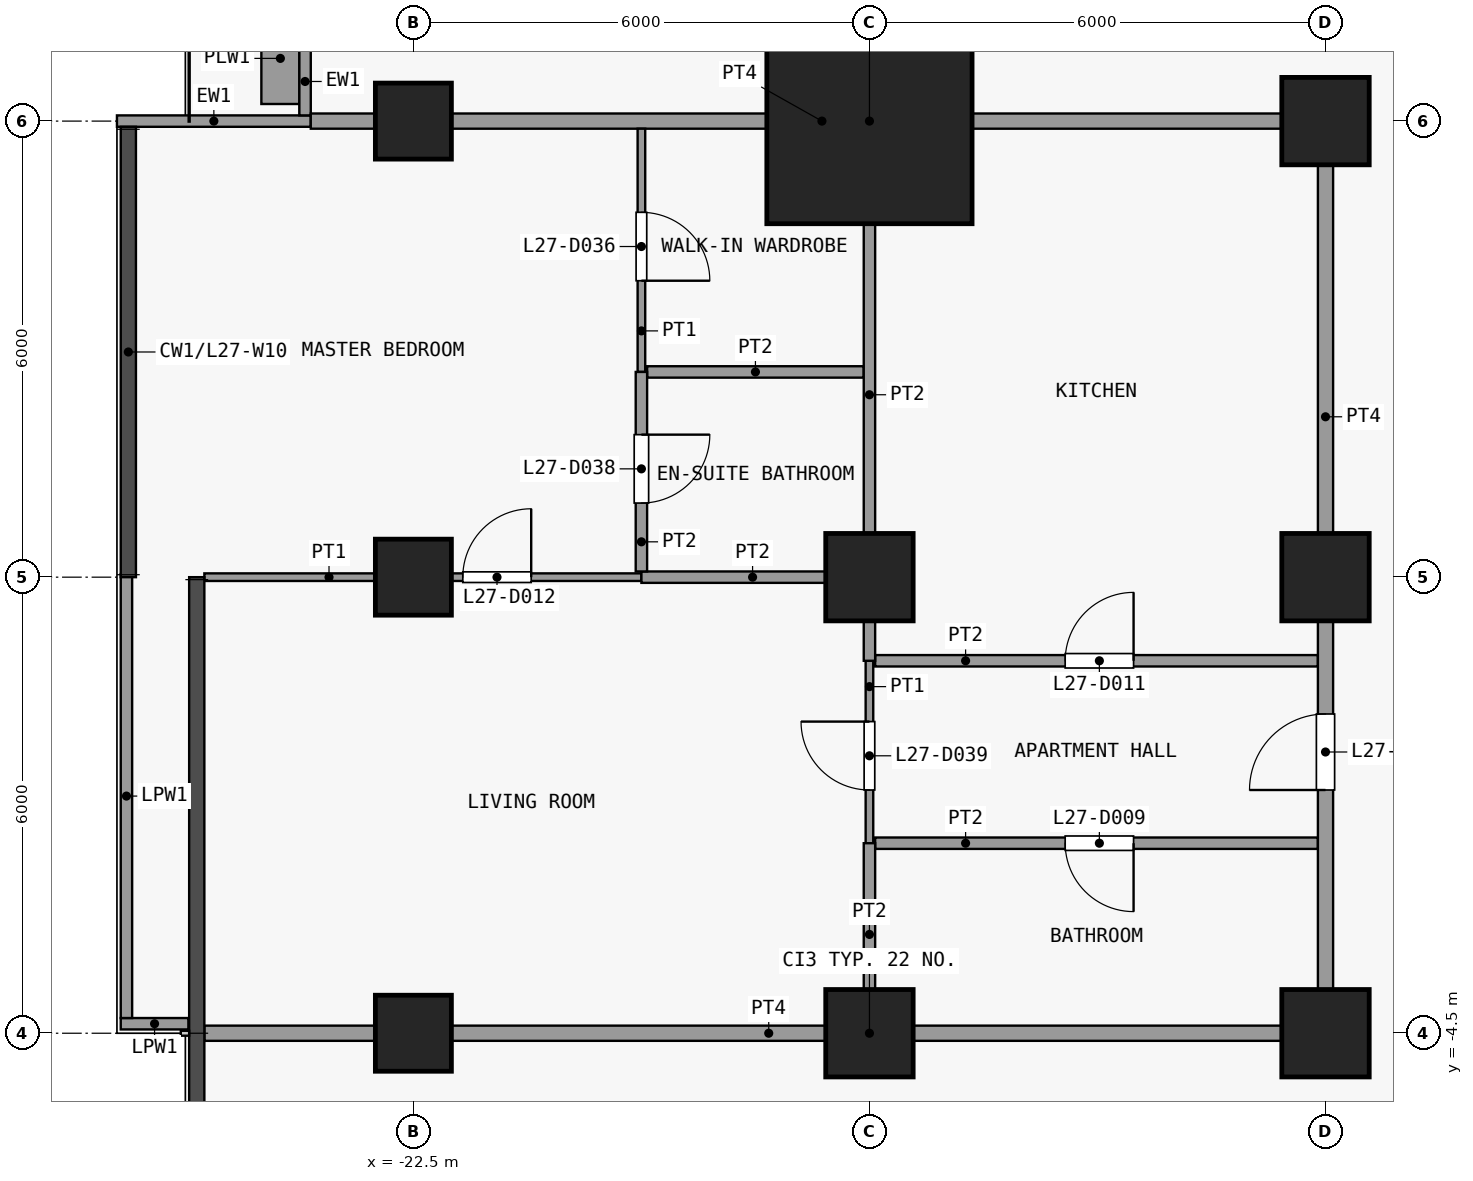
"""IFC4 building model, lengths in metres.
Left out: names, types, materials, properties, quantities, classifications, styles, units other than length and angle.
Written with IfcOpenShell. Run it as: python <this file> out.ifc"""

import sys

from ifc_helpers import new_model, si_unit, direction, frame, frame_2d, origin, origin_2d, place, context, subcontext, project, spatial, rectangle, extrude, element, fill, save


model = new_model("IFC4")
c1 = context("Model", 3, precision=1e-05, world=origin(), true_north=direction((0.0, 1.0)))
c2 = subcontext(c1, "Body", "Model", "MODEL_VIEW")
j1 = project(units=[si_unit("LENGTHUNIT", "METRE"), si_unit("PLANEANGLEUNIT", "RADIAN")], contexts=[c1])
p1 = place(None, origin())
s1 = spatial("IfcSite", under=j1, at=p1, CompositionType="ELEMENT")
p2 = place(p1, origin())
s2 = spatial("IfcBuilding", under=s1, at=p2, CompositionType="ELEMENT")
p3 = place(p2, frame((0.0, 0.0, 109.9)))
s3 = spatial("IfcBuildingStorey", under=s2, at=p3, CompositionType="ELEMENT", Elevation=109.9)
for number, where, z_axis, x_axis in (
    (1, (-22.5, -4.5, 0.0), (0.0, 0.0, 1.0), (1.0, 0.0, 0.0)),
    (2, (-22.5, 1.5, 0.0), (0.0, 0.0, 1.0), (1.0, 0.0, 0.0)),
    (3, (-22.5, 7.5, 0.0), (0.0, 0.0, 1.0), (1.0, 0.0, 0.0)),
):
    element("IfcColumn", number, at=place(p3, frame(where, z_axis=z_axis, x_axis=x_axis)), inside=s3, PredefinedType="COLUMN", context=c2, shape_type="SweptSolid", body=[
        extrude(rectangle(XDim=1.0, YDim=1.0, at=origin_2d()), origin(), (0.0, 0.0, 1.0), 3.6),
    ])
for number, where, z_axis, x_axis in (
    (4, (-16.5, -4.5, 0.0), (0.0, 0.0, 1.0), (1.0, 0.0, 0.0)),
    (5, (-16.5, 1.5, 0.0), (0.0, 0.0, 1.0), (1.0, 0.0, 0.0)),
):
    element("IfcColumn", number, at=place(p3, frame(where, z_axis=z_axis, x_axis=x_axis)), inside=s3, PredefinedType="COLUMN", context=c2, shape_type="SweptSolid", body=[
        extrude(rectangle(XDim=1.15, YDim=1.15, at=origin_2d()), origin(), (0.0, 0.0, 1.0), 3.6),
    ])
p4 = place(p3, frame((-16.5, 7.5, 0.0), z_axis=(0.0, 0.0, 1.0), x_axis=(1.0, 0.0, 0.0)))
e6 = element("IfcColumn", 6, at=p4, inside=s3, PredefinedType="COLUMN", context=c2, shape_type="SweptSolid", body=[
    extrude(rectangle(XDim=2.7, YDim=2.7, at=origin_2d()), origin(), (0.0, 0.0, 1.0), 3.6),
])
for number, where, z_axis, x_axis in (
    (7, (-10.5, -4.5, 0.0), (0.0, 0.0, 1.0), (1.0, 0.0, 0.0)),
    (8, (-10.5, 1.5, 0.0), (0.0, 0.0, 1.0), (1.0, 0.0, 0.0)),
    (9, (-10.5, 7.5, 0.0), (0.0, 0.0, 1.0), (1.0, 0.0, 0.0)),
):
    element("IfcColumn", number, at=place(p3, frame(where, z_axis=z_axis, x_axis=x_axis)), inside=s3, PredefinedType="COLUMN", context=c2, shape_type="SweptSolid", body=[
        extrude(rectangle(XDim=1.15, YDim=1.15, at=origin_2d()), origin(), (0.0, 0.0, 1.0), 3.6),
    ])
p5 = place(p3, frame((-23.85, 7.5, 0.0), z_axis=(0.0, 0.0, 1.0), x_axis=(-1.0, 0.0, 0.0)))
e10 = element("IfcWall", 10, at=p5, inside=s3, PredefinedType="SOLIDWALL", context=c2, shape_type="SweptSolid", body=[
    extrude(rectangle(XDim=2.55, YDim=0.15, at=frame_2d((1.275, 0.0))), origin(), (0.0, 0.0, 1.0), 3.3),
])
p6 = place(p3, frame((-23.925, 7.575, 0.0), z_axis=(0.0, 0.0, 1.0), x_axis=(0.0, 1.0, 0.0)))
e11 = element("IfcWall", 11, at=p6, inside=s3, PredefinedType="SOLIDWALL", context=c2, shape_type="SweptSolid", body=[
    extrude(rectangle(XDim=5.85, YDim=0.15, at=frame_2d((2.925, 0.0))), origin(), (0.0, 0.0, 1.0), 3.3),
])
p7 = place(p6, frame((3.825, 0.0, 0.0)))
e12 = element("IfcOpeningElement", 12, at=p7, cuts=e11, PredefinedType="OPENING", context=c2, shape_type="SweptSolid", body=[
    extrude(rectangle(XDim=1.2, YDim=2.4, at=frame_2d((0.6, 1.2))), frame((0.0, 0.085, 0.0), z_axis=(0.0, -1.0, 0.0), x_axis=(1.0, 0.0, 0.0)), (0.0, 0.0, 1.0), 0.17),
])
p8 = place(p6, frame((1.012, 0.0, 0.9)))
e13 = element("IfcOpeningElement", 13, at=p8, cuts=e11, PredefinedType="OPENING", context=c2, shape_type="SweptSolid", body=[
    extrude(rectangle(XDim=1.8, YDim=2.1, at=frame_2d((0.9, 1.05))), frame((0.0, 0.085, 0.0), z_axis=(0.0, -1.0, 0.0), x_axis=(1.0, 0.0, 0.0)), (0.0, 0.0, 1.0), 0.17),
])
p9 = place(p3, frame((-24.25, 7.725, 0.0), z_axis=(0.0, 0.0, 1.0), x_axis=(0.0, 1.0, 0.0)))
e14 = element("IfcWall", 14, at=p9, inside=s3, PredefinedType="USERDEFINED", context=c2, shape_type="SweptSolid", body=[
    extrude(rectangle(XDim=1.2, YDim=0.5, at=frame_2d((0.6, 0.0))), origin(), (0.0, 0.0, 1.0), 0.9),
])
p10 = place(p3, frame((-25.46, -4.375, 0.0), z_axis=(0.0, 0.0, 1.0), x_axis=(-1.0, 0.0, 0.0)))
e15 = element("IfcWall", 15, at=p10, inside=s3, PredefinedType="PARAPET", context=c2, shape_type="SweptSolid", body=[
    extrude(rectangle(XDim=0.89, YDim=0.15, at=frame_2d((0.445, 0.0))), origin(), (0.0, 0.0, 1.0), 1.15),
])
p11 = place(p3, frame((-26.275, -4.3, 0.0), z_axis=(0.0, 0.0, 1.0), x_axis=(0.0, 1.0, 0.0)))
e16 = element("IfcWall", 16, at=p11, inside=s3, PredefinedType="PARAPET", context=c2, shape_type="SweptSolid", body=[
    extrude(rectangle(XDim=5.84, YDim=0.15, at=frame_2d((2.92, 0.0))), origin(), (0.0, 0.0, 1.0), 1.15),
])
p12 = place(p3, frame((-25.25, -4.5, 0.0), z_axis=(0.0, 0.0, 1.0), x_axis=(1.0, 0.0, 0.0)))
e17 = element("IfcWall", 17, at=p12, inside=s3, PredefinedType="PARTITIONING", context=c2, shape_type="SweptSolid", body=[
    extrude(rectangle(XDim=14.85, YDim=0.2, at=frame_2d((7.425, 0.0))), origin(), (0.0, 0.0, 1.0), 3.3),
])
p13 = place(p3, frame((-16.425, -2.0, 0.0), z_axis=(0.0, 0.0, 1.0), x_axis=(1.0, 0.0, 0.0)))
e18 = element("IfcWall", 18, at=p13, inside=s3, PredefinedType="PARTITIONING", context=c2, shape_type="SweptSolid", body=[
    extrude(rectangle(XDim=5.825, YDim=0.15, at=frame_2d((2.913, 0.0))), origin(), (0.0, 0.0, 1.0), 3.3),
])
p14 = place(p13, frame((2.5, 0.0, 0.0)))
e19 = element("IfcOpeningElement", 19, at=p14, cuts=e18, PredefinedType="OPENING", context=c2, shape_type="SweptSolid", body=[
    extrude(rectangle(XDim=0.9, YDim=2.1, at=frame_2d((0.45, 1.05))), frame((0.0, 0.085, 0.0), z_axis=(0.0, -1.0, 0.0), x_axis=(1.0, 0.0, 0.0)), (0.0, 0.0, 1.0), 0.17),
])
p15 = place(p3, frame((-16.425, 0.4, 0.0), z_axis=(0.0, 0.0, 1.0), x_axis=(1.0, 0.0, 0.0)))
e20 = element("IfcWall", 20, at=p15, inside=s3, PredefinedType="PARTITIONING", context=c2, shape_type="SweptSolid", body=[
    extrude(rectangle(XDim=5.825, YDim=0.15, at=frame_2d((2.913, 0.0))), origin(), (0.0, 0.0, 1.0), 3.3),
])
p16 = place(p15, frame((2.5, 0.0, 0.0)))
e21 = element("IfcOpeningElement", 21, at=p16, cuts=e20, PredefinedType="OPENING", context=c2, shape_type="SweptSolid", body=[
    extrude(rectangle(XDim=0.9, YDim=2.1, at=frame_2d((0.45, 1.05))), frame((0.0, 0.085, 0.0), z_axis=(0.0, -1.0, 0.0), x_axis=(1.0, 0.0, 0.0)), (0.0, 0.0, 1.0), 0.17),
])
p17 = place(p3, frame((-25.25, 1.5, 0.0), z_axis=(0.0, 0.0, 1.0), x_axis=(1.0, 0.0, 0.0)))
e22 = element("IfcWall", 22, at=p17, inside=s3, PredefinedType="PARTITIONING", context=c2, shape_type="SweptSolid", body=[
    extrude(rectangle(XDim=5.75, YDim=0.1, at=frame_2d((2.875, 0.0))), origin(), (0.0, 0.0, 1.0), 3.3),
])
p18 = place(p17, frame((3.4, 0.0, 0.0)))
e23 = element("IfcOpeningElement", 23, at=p18, cuts=e22, PredefinedType="OPENING", context=c2, shape_type="SweptSolid", body=[
    extrude(rectangle(XDim=0.9, YDim=2.1, at=frame_2d((0.45, 1.05))), frame((0.0, 0.06, 0.0), z_axis=(0.0, -1.0, 0.0), x_axis=(1.0, 0.0, 0.0)), (0.0, 0.0, 1.0), 0.12),
])
p19 = place(p3, frame((-19.5, 1.5, 0.0), z_axis=(0.0, 0.0, 1.0), x_axis=(1.0, 0.0, 0.0)))
e24 = element("IfcWall", 24, at=p19, inside=s3, PredefinedType="PARTITIONING", context=c2, shape_type="SweptSolid", body=[
    extrude(rectangle(XDim=2.925, YDim=0.15, at=frame_2d((1.462, 0.0))), origin(), (0.0, 0.0, 1.0), 3.3),
])
p20 = place(p3, frame((-19.425, 4.2, 0.0), z_axis=(0.0, 0.0, 1.0), x_axis=(1.0, 0.0, 0.0)))
e25 = element("IfcWall", 25, at=p20, inside=s3, PredefinedType="PARTITIONING", context=c2, shape_type="SweptSolid", body=[
    extrude(rectangle(XDim=2.85, YDim=0.15, at=frame_2d((1.425, 0.0))), origin(), (0.0, 0.0, 1.0), 3.3),
])
p21 = place(p3, frame((-23.85, 7.5, 0.0), z_axis=(0.0, 0.0, 1.0), x_axis=(1.0, 0.0, 0.0)))
e26 = element("IfcWall", 26, at=p21, inside=s3, PredefinedType="PARTITIONING", context=c2, shape_type="SweptSolid", body=[
    extrude(rectangle(XDim=13.45, YDim=0.2, at=frame_2d((6.725, 0.0))), origin(), (0.0, 0.0, 1.0), 3.3),
])
p22 = place(p3, frame((-19.5, 4.2, 0.0), z_axis=(0.0, 0.0, 1.0), x_axis=(0.0, 1.0, 0.0)))
e27 = element("IfcWall", 27, at=p22, inside=s3, PredefinedType="PARTITIONING", context=c2, shape_type="SweptSolid", body=[
    extrude(rectangle(XDim=3.2, YDim=0.1, at=frame_2d((1.6, 0.0))), origin(), (0.0, 0.0, 1.0), 3.3),
])
p23 = place(p22, frame((1.2, 0.0, 0.0)))
e28 = element("IfcOpeningElement", 28, at=p23, cuts=e27, PredefinedType="OPENING", context=c2, shape_type="SweptSolid", body=[
    extrude(rectangle(XDim=0.9, YDim=2.1, at=frame_2d((0.45, 1.05))), frame((0.0, 0.06, 0.0), z_axis=(0.0, -1.0, 0.0), x_axis=(1.0, 0.0, 0.0)), (0.0, 0.0, 1.0), 0.12),
])
p24 = place(p3, frame((-19.5, 1.575, 0.0), z_axis=(0.0, 0.0, 1.0), x_axis=(0.0, 1.0, 0.0)))
e29 = element("IfcWall", 29, at=p24, inside=s3, PredefinedType="PARTITIONING", context=c2, shape_type="SweptSolid", body=[
    extrude(rectangle(XDim=2.625, YDim=0.15, at=frame_2d((1.312, 0.0))), origin(), (0.0, 0.0, 1.0), 3.3),
])
p25 = place(p24, frame((0.9, 0.0, 0.0)))
e30 = element("IfcOpeningElement", 30, at=p25, cuts=e29, PredefinedType="OPENING", context=c2, shape_type="SweptSolid", body=[
    extrude(rectangle(XDim=0.9, YDim=2.1, at=frame_2d((0.45, 1.05))), frame((0.0, 0.085, 0.0), z_axis=(0.0, -1.0, 0.0), x_axis=(1.0, 0.0, 0.0)), (0.0, 0.0, 1.0), 0.17),
])
p26 = place(p3, frame((-16.5, -2.0, 0.0), z_axis=(0.0, 0.0, 1.0), x_axis=(0.0, 1.0, 0.0)))
e31 = element("IfcWall", 31, at=p26, inside=s3, PredefinedType="PARTITIONING", context=c2, shape_type="SweptSolid", body=[
    extrude(rectangle(XDim=2.4, YDim=0.1, at=frame_2d((1.2, 0.0))), origin(), (0.0, 0.0, 1.0), 3.3),
])
p27 = place(p26, frame((0.7, 0.0, 0.0)))
e32 = element("IfcOpeningElement", 32, at=p27, cuts=e31, PredefinedType="OPENING", context=c2, shape_type="SweptSolid", body=[
    extrude(rectangle(XDim=0.9, YDim=2.1, at=frame_2d((0.45, 1.05))), frame((0.0, 0.06, 0.0), z_axis=(0.0, -1.0, 0.0), x_axis=(1.0, 0.0, 0.0)), (0.0, 0.0, 1.0), 0.12),
])
p28 = place(p3, frame((-16.5, -4.4, 0.0), z_axis=(0.0, 0.0, 1.0), x_axis=(0.0, 1.0, 0.0)))
e33 = element("IfcWall", 33, at=p28, inside=s3, PredefinedType="PARTITIONING", context=c2, shape_type="SweptSolid", body=[
    extrude(rectangle(XDim=2.4, YDim=0.15, at=frame_2d((1.2, 0.0))), origin(), (0.0, 0.0, 1.0), 3.3),
])
p29 = place(p3, frame((-16.5, 0.4, 0.0), z_axis=(0.0, 0.0, 1.0), x_axis=(0.0, 1.0, 0.0)))
e34 = element("IfcWall", 34, at=p29, inside=s3, PredefinedType="PARTITIONING", context=c2, shape_type="SweptSolid", body=[
    extrude(rectangle(XDim=7.0, YDim=0.15, at=frame_2d((3.5, 0.0))), origin(), (0.0, 0.0, 1.0), 3.3),
])
p30 = place(p3, frame((-10.5, -4.4, 0.0), z_axis=(0.0, 0.0, 1.0), x_axis=(0.0, 1.0, 0.0)))
e35 = element("IfcWall", 35, at=p30, inside=s3, PredefinedType="PARTITIONING", context=c2, shape_type="SweptSolid", body=[
    extrude(rectangle(XDim=11.8, YDim=0.2, at=frame_2d((5.9, 0.0))), origin(), (0.0, 0.0, 1.0), 3.3),
])
p31 = place(p30, frame((3.1, 0.0, 0.0)))
e36 = element("IfcOpeningElement", 36, at=p31, cuts=e35, PredefinedType="OPENING", context=c2, shape_type="SweptSolid", body=[
    extrude(rectangle(XDim=1.0, YDim=2.1, at=frame_2d((0.5, 1.05))), frame((0.0, 0.11, 0.0), z_axis=(0.0, -1.0, 0.0), x_axis=(1.0, 0.0, 0.0)), (0.0, 0.0, 1.0), 0.22),
])
p32 = place(p14, origin())
e37 = element("IfcDoor", 37, at=p32, inside=s3, OperationType="SINGLE_SWING_RIGHT", PredefinedType="DOOR", context=c2, shape_type="SweptSolid", body=[
    extrude(rectangle(XDim=0.9, YDim=2.1, at=frame_2d((0.45, 1.05))), frame((0.0, 0.025, 0.0), z_axis=(0.0, -1.0, 0.0), x_axis=(1.0, 0.0, 0.0)), (0.0, 0.0, 1.0), 0.05),
])
fill(e19, e37)
p33 = place(p16, origin())
e38 = element("IfcDoor", 38, at=p33, inside=s3, OperationType="SINGLE_SWING_LEFT", PredefinedType="DOOR", context=c2, shape_type="SweptSolid", body=[
    extrude(rectangle(XDim=0.9, YDim=2.1, at=frame_2d((0.45, 1.05))), frame((0.0, 0.025, 0.0), z_axis=(0.0, -1.0, 0.0), x_axis=(1.0, 0.0, 0.0)), (0.0, 0.0, 1.0), 0.05),
])
fill(e21, e38)
p34 = place(p18, origin())
e39 = element("IfcDoor", 39, at=p34, inside=s3, OperationType="SINGLE_SWING_LEFT", PredefinedType="DOOR", context=c2, shape_type="SweptSolid", body=[
    extrude(rectangle(XDim=0.9, YDim=2.1, at=frame_2d((0.45, 1.05))), frame((0.0, 0.025, 0.0), z_axis=(0.0, -1.0, 0.0), x_axis=(1.0, 0.0, 0.0)), (0.0, 0.0, 1.0), 0.05),
])
fill(e23, e39)
p35 = place(p23, origin())
e40 = element("IfcDoor", 40, at=p35, inside=s3, OperationType="SINGLE_SWING_LEFT", PredefinedType="DOOR", context=c2, shape_type="SweptSolid", body=[
    extrude(rectangle(XDim=0.9, YDim=2.1, at=frame_2d((0.45, 1.05))), frame((0.0, 0.025, 0.0), z_axis=(0.0, -1.0, 0.0), x_axis=(1.0, 0.0, 0.0)), (0.0, 0.0, 1.0), 0.05),
])
fill(e28, e40)
p36 = place(p25, origin())
e41 = element("IfcDoor", 41, at=p36, inside=s3, OperationType="SINGLE_SWING_RIGHT", PredefinedType="DOOR", context=c2, shape_type="SweptSolid", body=[
    extrude(rectangle(XDim=0.9, YDim=2.1, at=frame_2d((0.45, 1.05))), frame((0.0, 0.025, 0.0), z_axis=(0.0, -1.0, 0.0), x_axis=(1.0, 0.0, 0.0)), (0.0, 0.0, 1.0), 0.05),
])
fill(e30, e41)
p37 = place(p27, origin())
e42 = element("IfcDoor", 42, at=p37, inside=s3, OperationType="SINGLE_SWING_LEFT", PredefinedType="DOOR", context=c2, shape_type="SweptSolid", body=[
    extrude(rectangle(XDim=0.9, YDim=2.1, at=frame_2d((0.45, 1.05))), frame((0.0, 0.025, 0.0), z_axis=(0.0, -1.0, 0.0), x_axis=(1.0, 0.0, 0.0)), (0.0, 0.0, 1.0), 0.05),
])
fill(e32, e42)
p38 = place(p31, origin())
e43 = element("IfcDoor", 43, at=p38, inside=s3, OperationType="SINGLE_SWING_RIGHT", PredefinedType="DOOR", context=c2, shape_type="SweptSolid", body=[
    extrude(rectangle(XDim=1.0, YDim=2.1, at=frame_2d((0.5, 1.05))), frame((0.0, 0.025, 0.0), z_axis=(0.0, -1.0, 0.0), x_axis=(1.0, 0.0, 0.0)), (0.0, 0.0, 1.0), 0.05),
])
fill(e36, e43)
save(model, sys.argv[1])
